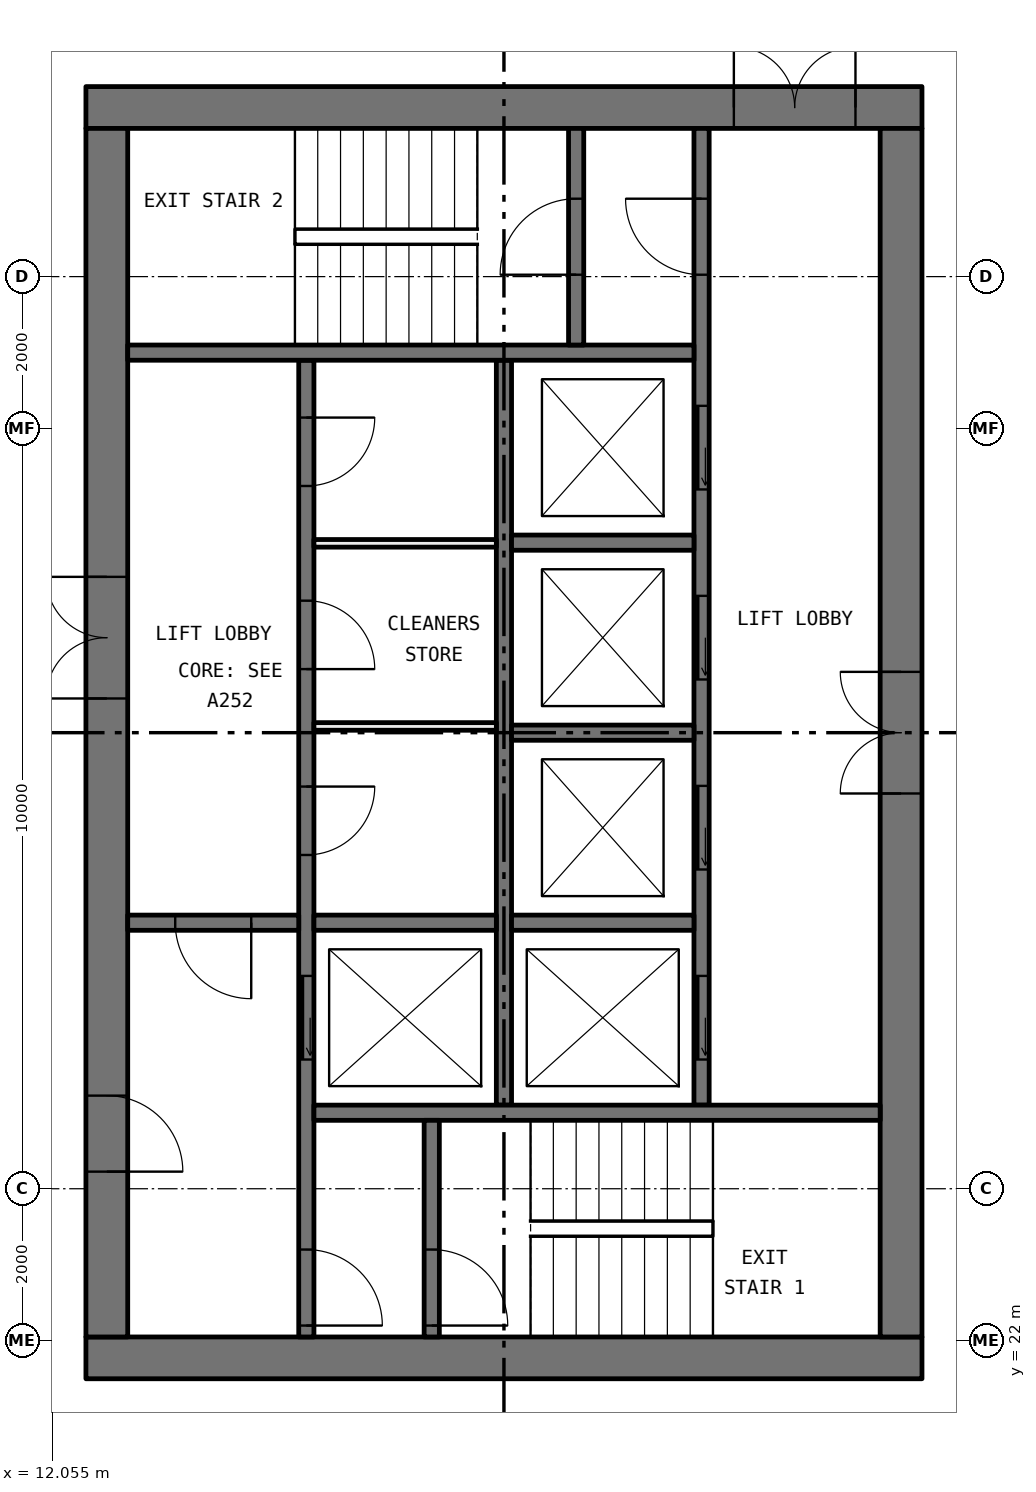
"""IFC4 building model, lengths in metres.
Left out: names, types, materials, properties, quantities, classifications, styles, units other than length and angle.
Written with IfcOpenShell. Run it as: python <this file> out.ifc"""

import sys

from ifc_helpers import new_model, si_unit, direction, frame, frame_2d, origin, place, context, subcontext, project, spatial, rectangle, extrude, element, fill, save


model = new_model("IFC4")
c1 = context("Model", 3, precision=1e-05, world=origin(), true_north=direction((0.0, 1.0)))
c2 = subcontext(c1, "Body", "Model", "MODEL_VIEW")
j1 = project(units=[si_unit("LENGTHUNIT", "METRE"), si_unit("PLANEANGLEUNIT", "RADIAN")], contexts=[c1])
p1 = place(None, origin())
s1 = spatial("IfcSite", under=j1, at=p1, CompositionType="ELEMENT")
p2 = place(p1, origin())
s2 = spatial("IfcBuilding", under=s1, at=p2, CompositionType="ELEMENT")
p3 = place(p2, frame((0.0, 0.0, 192.75)))
s3 = spatial("IfcBuildingStorey", under=s2, at=p3, CompositionType="ELEMENT", Elevation=192.75)
p4 = place(p3, frame((12.5, 21.775, 0.0), z_axis=(0.0, 0.0, 1.0), x_axis=(1.0, 0.0, 0.0)))
e1 = element("IfcWall", 1, at=p4, inside=s3, PredefinedType="SHEAR", context=c2, shape_type="SweptSolid", body=[
    extrude(rectangle(XDim=11.0, YDim=0.55, at=frame_2d((5.5, 0.0))), origin(), (0.0, 0.0, 1.0), 3.05),
])
p5 = place(p3, frame((12.5, 38.225, 0.0), z_axis=(0.0, 0.0, 1.0), x_axis=(1.0, 0.0, 0.0)))
e2 = element("IfcWall", 2, at=p5, inside=s3, PredefinedType="SHEAR", context=c2, shape_type="SweptSolid", body=[
    extrude(rectangle(XDim=11.0, YDim=0.55, at=frame_2d((5.5, 0.0))), origin(), (0.0, 0.0, 1.0), 3.05),
])
p6 = place(p5, frame((8.525, 0.0, 0.0)))
e3 = element("IfcOpeningElement", 3, at=p6, cuts=e2, PredefinedType="OPENING", context=c2, shape_type="SweptSolid", body=[
    extrude(rectangle(XDim=1.6, YDim=2.1, at=frame_2d((0.8, 1.05))), frame((0.0, 0.285, 0.0), z_axis=(0.0, -1.0, 0.0), x_axis=(1.0, 0.0, 0.0)), (0.0, 0.0, 1.0), 0.57),
])
p7 = place(p3, frame((12.775, 22.05, 0.0), z_axis=(0.0, 0.0, 1.0), x_axis=(0.0, 1.0, 0.0)))
e4 = element("IfcWall", 4, at=p7, inside=s3, PredefinedType="SHEAR", context=c2, shape_type="SweptSolid", body=[
    extrude(rectangle(XDim=15.9, YDim=0.55, at=frame_2d((7.95, 0.0))), origin(), (0.0, 0.0, 1.0), 3.05),
])
p8 = place(p7, frame((8.4, 0.0, 0.0)))
e5 = element("IfcOpeningElement", 5, at=p8, cuts=e4, PredefinedType="OPENING", context=c2, shape_type="SweptSolid", body=[
    extrude(rectangle(XDim=1.6, YDim=2.1, at=frame_2d((0.8, 1.05))), frame((0.0, 0.285, 0.0), z_axis=(0.0, -1.0, 0.0), x_axis=(1.0, 0.0, 0.0)), (0.0, 0.0, 1.0), 0.57),
])
p9 = place(p7, frame((2.175, 0.0, 0.0)))
e6 = element("IfcOpeningElement", 6, at=p9, cuts=e4, PredefinedType="OPENING", context=c2, shape_type="SweptSolid", body=[
    extrude(rectangle(XDim=1.0, YDim=2.1, at=frame_2d((0.5, 1.05))), frame((0.0, 0.285, 0.0), z_axis=(0.0, -1.0, 0.0), x_axis=(1.0, 0.0, 0.0)), (0.0, 0.0, 1.0), 0.57),
])
p10 = place(p3, frame((23.225, 22.05, 0.0), z_axis=(0.0, 0.0, 1.0), x_axis=(0.0, 1.0, 0.0)))
e7 = element("IfcWall", 7, at=p10, inside=s3, PredefinedType="SHEAR", context=c2, shape_type="SweptSolid", body=[
    extrude(rectangle(XDim=15.9, YDim=0.55, at=frame_2d((7.95, 0.0))), origin(), (0.0, 0.0, 1.0), 3.05),
])
p11 = place(p10, frame((7.15, 0.0, 0.0)))
e8 = element("IfcOpeningElement", 8, at=p11, cuts=e7, PredefinedType="OPENING", context=c2, shape_type="SweptSolid", body=[
    extrude(rectangle(XDim=1.6, YDim=2.1, at=frame_2d((0.8, 1.05))), frame((0.0, 0.285, 0.0), z_axis=(0.0, -1.0, 0.0), x_axis=(1.0, 0.0, 0.0)), (0.0, 0.0, 1.0), 0.57),
])
p12 = place(p3, frame((15.4, 22.05, 0.0), z_axis=(0.0, 0.0, 1.0), x_axis=(0.0, 1.0, 0.0)))
e9 = element("IfcWall", 9, at=p12, inside=s3, PredefinedType="SOLIDWALL", context=c2, shape_type="SweptSolid", body=[
    extrude(rectangle(XDim=12.85, YDim=0.2, at=frame_2d((6.425, 0.0))), origin(), (0.0, 0.0, 1.0), 3.05),
])
p13 = place(p12, frame((3.65, 0.0, 0.0)))
e10 = element("IfcOpeningElement", 10, at=p13, cuts=e9, PredefinedType="OPENING", context=c2, shape_type="SweptSolid", body=[
    extrude(rectangle(XDim=1.1, YDim=2.1, at=frame_2d((0.55, 1.05))), frame((0.0, 0.11, 0.0), z_axis=(0.0, -1.0, 0.0), x_axis=(1.0, 0.0, 0.0)), (0.0, 0.0, 1.0), 0.22),
])
p14 = place(p12, frame((0.15, 0.0, 0.0)))
e11 = element("IfcOpeningElement", 11, at=p14, cuts=e9, PredefinedType="OPENING", context=c2, shape_type="SweptSolid", body=[
    extrude(rectangle(XDim=1.0, YDim=2.1, at=frame_2d((0.5, 1.05))), frame((0.0, 0.11, 0.0), z_axis=(0.0, -1.0, 0.0), x_axis=(1.0, 0.0, 0.0)), (0.0, 0.0, 1.0), 0.22),
])
p15 = place(p12, frame((6.341, 0.0, 0.0)))
e12 = element("IfcOpeningElement", 12, at=p15, cuts=e9, PredefinedType="OPENING", context=c2, shape_type="SweptSolid", body=[
    extrude(rectangle(XDim=0.9, YDim=2.1, at=frame_2d((0.45, 1.05))), frame((0.0, 0.11, 0.0), z_axis=(0.0, -1.0, 0.0), x_axis=(1.0, 0.0, 0.0)), (0.0, 0.0, 1.0), 0.22),
])
p16 = place(p12, frame((8.787, 0.0, 0.0)))
e13 = element("IfcOpeningElement", 13, at=p16, cuts=e9, PredefinedType="OPENING", context=c2, shape_type="SweptSolid", body=[
    extrude(rectangle(XDim=0.9, YDim=2.1, at=frame_2d((0.45, 1.05))), frame((0.0, 0.11, 0.0), z_axis=(0.0, -1.0, 0.0), x_axis=(1.0, 0.0, 0.0)), (0.0, 0.0, 1.0), 0.22),
])
p17 = place(p12, frame((11.196, 0.0, 0.0)))
e14 = element("IfcOpeningElement", 14, at=p17, cuts=e9, PredefinedType="OPENING", context=c2, shape_type="SweptSolid", body=[
    extrude(rectangle(XDim=0.9, YDim=2.1, at=frame_2d((0.45, 1.05))), frame((0.0, 0.11, 0.0), z_axis=(0.0, -1.0, 0.0), x_axis=(1.0, 0.0, 0.0)), (0.0, 0.0, 1.0), 0.22),
])
p18 = place(p3, frame((20.6, 25.1, 0.0), z_axis=(0.0, 0.0, 1.0), x_axis=(0.0, 1.0, 0.0)))
e15 = element("IfcWall", 15, at=p18, inside=s3, PredefinedType="SOLIDWALL", context=c2, shape_type="SweptSolid", body=[
    extrude(rectangle(XDim=12.85, YDim=0.2, at=frame_2d((6.425, 0.0))), origin(), (0.0, 0.0, 1.0), 3.05),
])
p19 = place(p18, frame((0.6, 0.0, 0.0)))
e16 = element("IfcOpeningElement", 16, at=p19, cuts=e15, PredefinedType="OPENING", context=c2, shape_type="SweptSolid", body=[
    extrude(rectangle(XDim=1.1, YDim=2.1, at=frame_2d((0.55, 1.05))), frame((0.0, 0.11, 0.0), z_axis=(0.0, -1.0, 0.0), x_axis=(1.0, 0.0, 0.0)), (0.0, 0.0, 1.0), 0.22),
])
p20 = place(p18, frame((3.1, 0.0, 0.0)))
e17 = element("IfcOpeningElement", 17, at=p20, cuts=e15, PredefinedType="OPENING", context=c2, shape_type="SweptSolid", body=[
    extrude(rectangle(XDim=1.1, YDim=2.1, at=frame_2d((0.55, 1.05))), frame((0.0, 0.11, 0.0), z_axis=(0.0, -1.0, 0.0), x_axis=(1.0, 0.0, 0.0)), (0.0, 0.0, 1.0), 0.22),
])
p21 = place(p18, frame((5.6, 0.0, 0.0)))
e18 = element("IfcOpeningElement", 18, at=p21, cuts=e15, PredefinedType="OPENING", context=c2, shape_type="SweptSolid", body=[
    extrude(rectangle(XDim=1.1, YDim=2.1, at=frame_2d((0.55, 1.05))), frame((0.0, 0.11, 0.0), z_axis=(0.0, -1.0, 0.0), x_axis=(1.0, 0.0, 0.0)), (0.0, 0.0, 1.0), 0.22),
])
p22 = place(p18, frame((8.1, 0.0, 0.0)))
e19 = element("IfcOpeningElement", 19, at=p22, cuts=e15, PredefinedType="OPENING", context=c2, shape_type="SweptSolid", body=[
    extrude(rectangle(XDim=1.1, YDim=2.1, at=frame_2d((0.55, 1.05))), frame((0.0, 0.11, 0.0), z_axis=(0.0, -1.0, 0.0), x_axis=(1.0, 0.0, 0.0)), (0.0, 0.0, 1.0), 0.22),
])
p23 = place(p18, frame((10.925, 0.0, 0.0)))
e20 = element("IfcOpeningElement", 20, at=p23, cuts=e15, PredefinedType="OPENING", context=c2, shape_type="SweptSolid", body=[
    extrude(rectangle(XDim=1.0, YDim=2.1, at=frame_2d((0.5, 1.05))), frame((0.0, 0.11, 0.0), z_axis=(0.0, -1.0, 0.0), x_axis=(1.0, 0.0, 0.0)), (0.0, 0.0, 1.0), 0.22),
])
p24 = place(p3, frame((18.0, 25.1, 0.0), z_axis=(0.0, 0.0, 1.0), x_axis=(0.0, 1.0, 0.0)))
e21 = element("IfcWall", 21, at=p24, inside=s3, PredefinedType="SOLIDWALL", context=c2, shape_type="SweptSolid", body=[
    extrude(rectangle(XDim=9.8, YDim=0.2, at=frame_2d((4.9, 0.0))), origin(), (0.0, 0.0, 1.0), 3.05),
])
for number, where, z_axis, x_axis in (
    (22, (15.5, 25.0, 0.0), (0.0, 0.0, 1.0), (1.0, 0.0, 0.0)),
    (23, (13.05, 35.0, 0.0), (0.0, 0.0, 1.0), (1.0, 0.0, 0.0)),
):
    element("IfcWall", number, at=place(p3, frame(where, z_axis=z_axis, x_axis=x_axis)), inside=s3, PredefinedType="SOLIDWALL", context=c2, shape_type="SweptSolid", body=[
        extrude(rectangle(XDim=7.45, YDim=0.2, at=frame_2d((3.725, 0.0))), origin(), (0.0, 0.0, 1.0), 3.05),
    ])
p25 = place(p3, frame((13.05, 27.5, 0.0), z_axis=(0.0, 0.0, 1.0), x_axis=(1.0, 0.0, 0.0)))
e24 = element("IfcWall", 24, at=p25, inside=s3, PredefinedType="SOLIDWALL", context=c2, shape_type="SweptSolid", body=[
    extrude(rectangle(XDim=2.25, YDim=0.2, at=frame_2d((1.125, 0.0))), origin(), (0.0, 0.0, 1.0), 3.05),
])
p26 = place(p25, frame((0.625, 0.0, 0.0)))
e25 = element("IfcOpeningElement", 25, at=p26, cuts=e24, PredefinedType="OPENING", context=c2, shape_type="SweptSolid", body=[
    extrude(rectangle(XDim=1.0, YDim=2.1, at=frame_2d((0.5, 1.05))), frame((0.0, 0.11, 0.0), z_axis=(0.0, -1.0, 0.0), x_axis=(1.0, 0.0, 0.0)), (0.0, 0.0, 1.0), 0.22),
])
p27 = place(p3, frame((17.05, 22.05, 0.0), z_axis=(0.0, 0.0, 1.0), x_axis=(0.0, 1.0, 0.0)))
e26 = element("IfcWall", 26, at=p27, inside=s3, PredefinedType="SOLIDWALL", context=c2, shape_type="SweptSolid", body=[
    extrude(rectangle(XDim=2.85, YDim=0.2, at=frame_2d((1.425, 0.0))), origin(), (0.0, 0.0, 1.0), 3.05),
])
p28 = place(p27, frame((0.15, 0.0, 0.0)))
e27 = element("IfcOpeningElement", 27, at=p28, cuts=e26, PredefinedType="OPENING", context=c2, shape_type="SweptSolid", body=[
    extrude(rectangle(XDim=1.0, YDim=2.1, at=frame_2d((0.5, 1.05))), frame((0.0, 0.11, 0.0), z_axis=(0.0, -1.0, 0.0), x_axis=(1.0, 0.0, 0.0)), (0.0, 0.0, 1.0), 0.22),
])
p29 = place(p3, frame((18.95, 35.1, 0.0), z_axis=(0.0, 0.0, 1.0), x_axis=(0.0, 1.0, 0.0)))
e28 = element("IfcWall", 28, at=p29, inside=s3, PredefinedType="SOLIDWALL", context=c2, shape_type="SweptSolid", body=[
    extrude(rectangle(XDim=2.85, YDim=0.2, at=frame_2d((1.425, 0.0))), origin(), (0.0, 0.0, 1.0), 3.05),
])
p30 = place(p29, frame((0.925, 0.0, 0.0)))
e29 = element("IfcOpeningElement", 29, at=p30, cuts=e28, PredefinedType="OPENING", context=c2, shape_type="SweptSolid", body=[
    extrude(rectangle(XDim=1.0, YDim=2.1, at=frame_2d((0.5, 1.05))), frame((0.0, 0.11, 0.0), z_axis=(0.0, -1.0, 0.0), x_axis=(1.0, 0.0, 0.0)), (0.0, 0.0, 1.0), 0.22),
])
for number, where, z_axis, x_axis in (
    (30, (15.5, 27.5, 0.0), (0.0, 0.0, 1.0), (1.0, 0.0, 0.0)),
    (31, (18.1, 27.5, 0.0), (0.0, 0.0, 1.0), (1.0, 0.0, 0.0)),
    (32, (18.1, 30.0, 0.0), (0.0, 0.0, 1.0), (1.0, 0.0, 0.0)),
    (33, (18.1, 32.5, 0.0), (0.0, 0.0, 1.0), (1.0, 0.0, 0.0)),
):
    element("IfcWall", number, at=place(p3, frame(where, z_axis=z_axis, x_axis=x_axis)), inside=s3, PredefinedType="SOLIDWALL", context=c2, shape_type="SweptSolid", body=[
        extrude(rectangle(XDim=2.4, YDim=0.2, at=frame_2d((1.2, 0.0))), origin(), (0.0, 0.0, 1.0), 3.05),
    ])
for number, where, z_axis, x_axis in (
    (34, (15.5, 30.082, 0.0), (0.0, 0.0, 1.0), (1.0, 0.0, 0.0)),
    (35, (15.5, 32.491, 0.0), (0.0, 0.0, 1.0), (1.0, 0.0, 0.0)),
):
    element("IfcWall", number, at=place(p3, frame(where, z_axis=z_axis, x_axis=x_axis)), inside=s3, PredefinedType="PARTITIONING", context=c2, shape_type="SweptSolid", body=[
        extrude(rectangle(XDim=2.4, YDim=0.1, at=frame_2d((1.2, 0.0))), origin(), (0.0, 0.0, 1.0), 3.05),
    ])
p31 = place(p19, origin())
e36 = element("IfcDoor", 36, at=p31, inside=s3, OperationType="SLIDING_TO_LEFT", PredefinedType="DOOR", context=c2, shape_type="SweptSolid", body=[
    extrude(rectangle(XDim=1.1, YDim=2.1, at=frame_2d((0.55, 1.05))), frame((0.0, 0.025, 0.0), z_axis=(0.0, -1.0, 0.0), x_axis=(1.0, 0.0, 0.0)), (0.0, 0.0, 1.0), 0.05),
])
fill(e16, e36)
p32 = place(p20, origin())
e37 = element("IfcDoor", 37, at=p32, inside=s3, OperationType="SLIDING_TO_LEFT", PredefinedType="DOOR", context=c2, shape_type="SweptSolid", body=[
    extrude(rectangle(XDim=1.1, YDim=2.1, at=frame_2d((0.55, 1.05))), frame((0.0, 0.025, 0.0), z_axis=(0.0, -1.0, 0.0), x_axis=(1.0, 0.0, 0.0)), (0.0, 0.0, 1.0), 0.05),
])
fill(e17, e37)
p33 = place(p21, origin())
e38 = element("IfcDoor", 38, at=p33, inside=s3, OperationType="SLIDING_TO_LEFT", PredefinedType="DOOR", context=c2, shape_type="SweptSolid", body=[
    extrude(rectangle(XDim=1.1, YDim=2.1, at=frame_2d((0.55, 1.05))), frame((0.0, 0.025, 0.0), z_axis=(0.0, -1.0, 0.0), x_axis=(1.0, 0.0, 0.0)), (0.0, 0.0, 1.0), 0.05),
])
fill(e18, e38)
p34 = place(p22, origin())
e39 = element("IfcDoor", 39, at=p34, inside=s3, OperationType="SLIDING_TO_LEFT", PredefinedType="DOOR", context=c2, shape_type="SweptSolid", body=[
    extrude(rectangle(XDim=1.1, YDim=2.1, at=frame_2d((0.55, 1.05))), frame((0.0, 0.025, 0.0), z_axis=(0.0, -1.0, 0.0), x_axis=(1.0, 0.0, 0.0)), (0.0, 0.0, 1.0), 0.05),
])
fill(e19, e39)
p35 = place(p13, origin())
e40 = element("IfcDoor", 40, at=p35, inside=s3, OperationType="SLIDING_TO_LEFT", PredefinedType="DOOR", context=c2, shape_type="SweptSolid", body=[
    extrude(rectangle(XDim=1.1, YDim=2.1, at=frame_2d((0.55, 1.05))), frame((0.0, 0.025, 0.0), z_axis=(0.0, -1.0, 0.0), x_axis=(1.0, 0.0, 0.0)), (0.0, 0.0, 1.0), 0.05),
])
fill(e10, e40)
p36 = place(p28, frame((1.0, 0.0, 0.0), x_axis=(-1.0, 0.0, 0.0)))
e41 = element("IfcDoor", 41, at=p36, inside=s3, OperationType="SINGLE_SWING_LEFT", PredefinedType="DOOR", context=c2, shape_type="SweptSolid", body=[
    extrude(rectangle(XDim=1.0, YDim=2.1, at=frame_2d((0.5, 1.05))), frame((0.0, 0.025, 0.0), z_axis=(0.0, -1.0, 0.0), x_axis=(1.0, 0.0, 0.0)), (0.0, 0.0, 1.0), 0.05),
])
fill(e27, e41)
p37 = place(p14, frame((1.0, 0.0, 0.0), x_axis=(-1.0, 0.0, 0.0)))
e42 = element("IfcDoor", 42, at=p37, inside=s3, OperationType="SINGLE_SWING_LEFT", PredefinedType="DOOR", context=c2, shape_type="SweptSolid", body=[
    extrude(rectangle(XDim=1.0, YDim=2.1, at=frame_2d((0.5, 1.05))), frame((0.0, 0.025, 0.0), z_axis=(0.0, -1.0, 0.0), x_axis=(1.0, 0.0, 0.0)), (0.0, 0.0, 1.0), 0.05),
])
fill(e11, e42)
p38 = place(p23, origin())
e43 = element("IfcDoor", 43, at=p38, inside=s3, OperationType="SINGLE_SWING_LEFT", PredefinedType="DOOR", context=c2, shape_type="SweptSolid", body=[
    extrude(rectangle(XDim=1.0, YDim=2.1, at=frame_2d((0.5, 1.05))), frame((0.0, 0.025, 0.0), z_axis=(0.0, -1.0, 0.0), x_axis=(1.0, 0.0, 0.0)), (0.0, 0.0, 1.0), 0.05),
])
fill(e20, e43)
p39 = place(p30, origin())
e44 = element("IfcDoor", 44, at=p39, inside=s3, OperationType="SINGLE_SWING_RIGHT", PredefinedType="DOOR", context=c2, shape_type="SweptSolid", body=[
    extrude(rectangle(XDim=1.0, YDim=2.1, at=frame_2d((0.5, 1.05))), frame((0.0, 0.025, 0.0), z_axis=(0.0, -1.0, 0.0), x_axis=(1.0, 0.0, 0.0)), (0.0, 0.0, 1.0), 0.05),
])
fill(e29, e44)
p40 = place(p26, frame((1.0, 0.0, 0.0), x_axis=(-1.0, 0.0, 0.0)))
e45 = element("IfcDoor", 45, at=p40, inside=s3, OperationType="SINGLE_SWING_RIGHT", PredefinedType="DOOR", context=c2, shape_type="SweptSolid", body=[
    extrude(rectangle(XDim=1.0, YDim=2.1, at=frame_2d((0.5, 1.05))), frame((0.0, 0.025, 0.0), z_axis=(0.0, -1.0, 0.0), x_axis=(1.0, 0.0, 0.0)), (0.0, 0.0, 1.0), 0.05),
])
fill(e25, e45)
p41 = place(p8, origin())
e46 = element("IfcDoor", 46, at=p41, inside=s3, OperationType="DOUBLE_DOOR_SINGLE_SWING", PredefinedType="DOOR", context=c2, shape_type="SweptSolid", body=[
    extrude(rectangle(XDim=1.6, YDim=2.1, at=frame_2d((0.8, 1.05))), frame((0.0, 0.025, 0.0), z_axis=(0.0, -1.0, 0.0), x_axis=(1.0, 0.0, 0.0)), (0.0, 0.0, 1.0), 0.05),
])
fill(e5, e46)
p42 = place(p9, frame((1.0, 0.0, 0.0), x_axis=(-1.0, 0.0, 0.0)))
e47 = element("IfcDoor", 47, at=p42, inside=s3, OperationType="SINGLE_SWING_LEFT", PredefinedType="DOOR", context=c2, shape_type="SweptSolid", body=[
    extrude(rectangle(XDim=1.0, YDim=2.1, at=frame_2d((0.5, 1.05))), frame((0.0, 0.025, 0.0), z_axis=(0.0, -1.0, 0.0), x_axis=(1.0, 0.0, 0.0)), (0.0, 0.0, 1.0), 0.05),
])
fill(e6, e47)
p43 = place(p6, origin())
e48 = element("IfcDoor", 48, at=p43, inside=s3, OperationType="DOUBLE_DOOR_SINGLE_SWING", PredefinedType="DOOR", context=c2, shape_type="SweptSolid", body=[
    extrude(rectangle(XDim=1.6, YDim=2.1, at=frame_2d((0.8, 1.05))), frame((0.0, 0.025, 0.0), z_axis=(0.0, -1.0, 0.0), x_axis=(1.0, 0.0, 0.0)), (0.0, 0.0, 1.0), 0.05),
])
fill(e3, e48)
p44 = place(p11, origin())
e49 = element("IfcDoor", 49, at=p44, inside=s3, OperationType="DOUBLE_DOOR_SINGLE_SWING", PredefinedType="DOOR", context=c2, shape_type="SweptSolid", body=[
    extrude(rectangle(XDim=1.6, YDim=2.1, at=frame_2d((0.8, 1.05))), frame((0.0, 0.025, 0.0), z_axis=(0.0, -1.0, 0.0), x_axis=(1.0, 0.0, 0.0)), (0.0, 0.0, 1.0), 0.05),
])
fill(e8, e49)
p45 = place(p15, frame((0.9, 0.0, 0.0), x_axis=(-1.0, 0.0, 0.0)))
e50 = element("IfcDoor", 50, at=p45, inside=s3, OperationType="SINGLE_SWING_RIGHT", PredefinedType="DOOR", context=c2, shape_type="SweptSolid", body=[
    extrude(rectangle(XDim=0.9, YDim=2.1, at=frame_2d((0.45, 1.05))), frame((0.0, 0.025, 0.0), z_axis=(0.0, -1.0, 0.0), x_axis=(1.0, 0.0, 0.0)), (0.0, 0.0, 1.0), 0.05),
])
fill(e12, e50)
p46 = place(p16, frame((0.9, 0.0, 0.0), x_axis=(-1.0, 0.0, 0.0)))
e51 = element("IfcDoor", 51, at=p46, inside=s3, OperationType="SINGLE_SWING_LEFT", PredefinedType="DOOR", context=c2, shape_type="SweptSolid", body=[
    extrude(rectangle(XDim=0.9, YDim=2.1, at=frame_2d((0.45, 1.05))), frame((0.0, 0.025, 0.0), z_axis=(0.0, -1.0, 0.0), x_axis=(1.0, 0.0, 0.0)), (0.0, 0.0, 1.0), 0.05),
])
fill(e13, e51)
p47 = place(p17, frame((0.9, 0.0, 0.0), x_axis=(-1.0, 0.0, 0.0)))
e52 = element("IfcDoor", 52, at=p47, inside=s3, OperationType="SINGLE_SWING_RIGHT", PredefinedType="DOOR", context=c2, shape_type="SweptSolid", body=[
    extrude(rectangle(XDim=0.9, YDim=2.1, at=frame_2d((0.45, 1.05))), frame((0.0, 0.025, 0.0), z_axis=(0.0, -1.0, 0.0), x_axis=(1.0, 0.0, 0.0)), (0.0, 0.0, 1.0), 0.05),
])
fill(e14, e52)
save(model, sys.argv[1])
